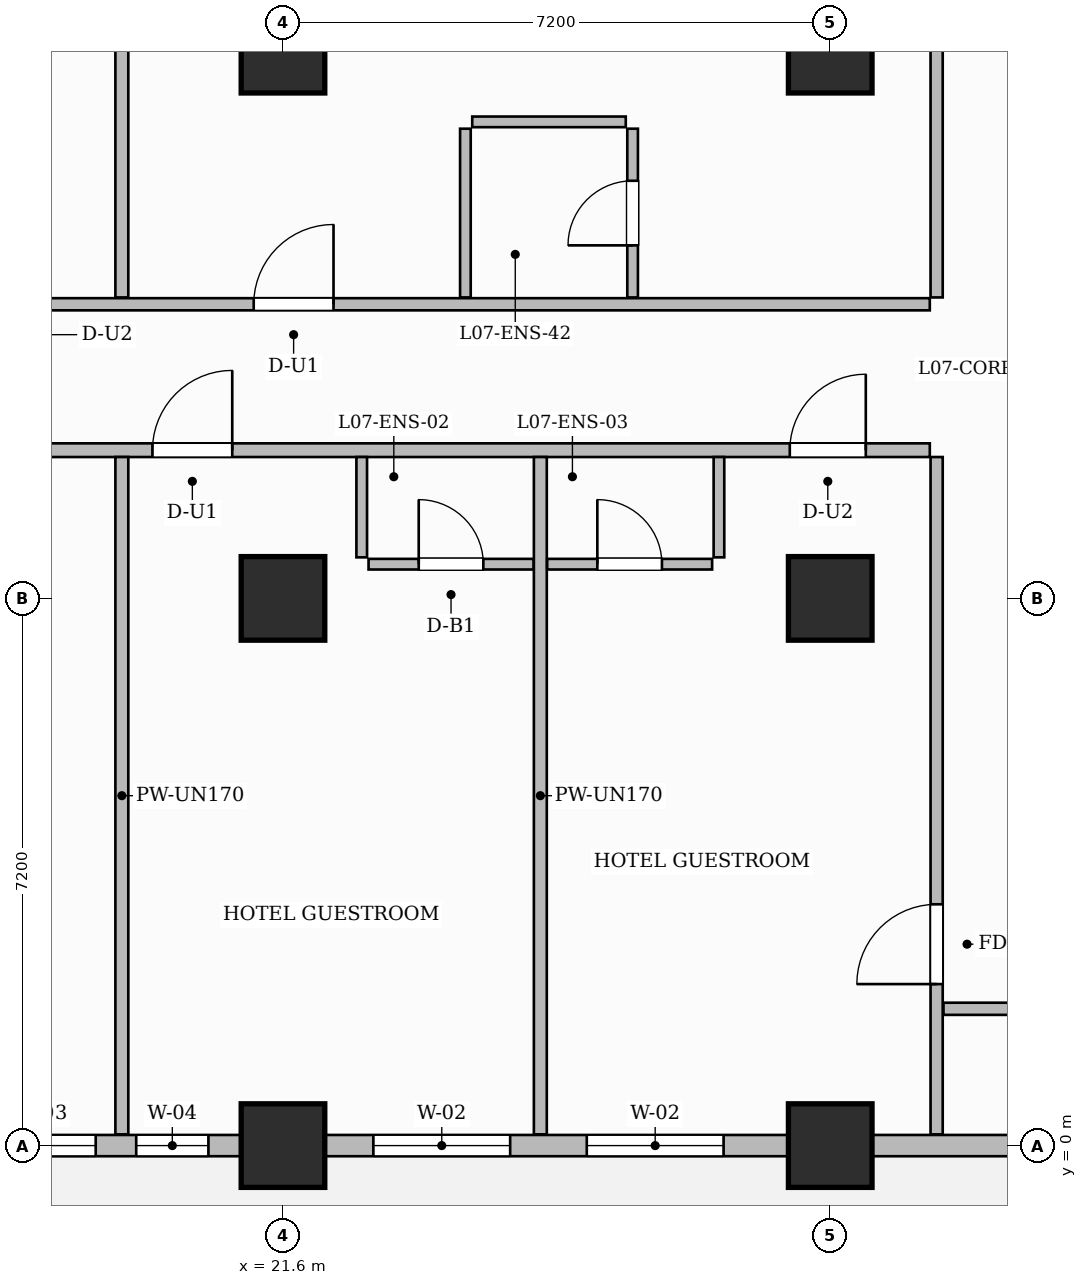
"""IFC4 building model, lengths in metres.
Left out: names, types, materials, properties, quantities, classifications, styles, units other than length and angle.
Written with IfcOpenShell. Run it as: python <this file> out.ifc"""

import sys

from ifc_helpers import new_model, si_unit, direction, frame, frame_2d, origin, origin_2d, place, context, subcontext, project, spatial, rectangle, extrude, source, transform, mapped, element, fill, save


model = new_model("IFC4")
c1 = context("Model", 3, precision=1e-05, world=origin(), true_north=direction((0.0, 1.0)))
c2 = subcontext(c1, "Body", "Model", "MODEL_VIEW")
j1 = project(units=[si_unit("LENGTHUNIT", "METRE"), si_unit("PLANEANGLEUNIT", "RADIAN")], contexts=[c1])
p1 = place(None, origin())
s1 = spatial("IfcSite", under=j1, at=p1, CompositionType="ELEMENT")
p2 = place(p1, origin())
s2 = spatial("IfcBuilding", under=s1, at=p2, CompositionType="ELEMENT")
p3 = place(p2, frame((0.0, 0.0, 36.1)))
s3 = spatial("IfcBuildingStorey", under=s2, at=p3, CompositionType="ELEMENT", Elevation=36.1)
m1 = source(origin(), c2, "Body", "SweptSolid", [
    extrude(rectangle(XDim=1.1, YDim=1.1, at=origin_2d()), origin(), (0.0, 0.0, 1.0), 3.7),
])
for number, where, z_axis, x_axis in (
    (1, (21.6, 0.0, 0.0), (0.0, 0.0, 1.0), (1.0, 0.0, 0.0)),
    (2, (21.6, 7.2, 0.0), (0.0, 0.0, 1.0), (1.0, 0.0, 0.0)),
    (3, (21.6, 14.4, 0.0), (0.0, 0.0, 1.0), (1.0, 0.0, 0.0)),
    (4, (28.8, 0.0, 0.0), (0.0, 0.0, 1.0), (1.0, 0.0, 0.0)),
    (5, (28.8, 7.2, 0.0), (0.0, 0.0, 1.0), (1.0, 0.0, 0.0)),
    (6, (28.8, 14.4, 0.0), (0.0, 0.0, 1.0), (1.0, 0.0, 0.0)),
):
    element("IfcColumn", number, at=place(p3, frame(where, z_axis=z_axis, x_axis=x_axis)), inside=s3, PredefinedType="COLUMN", context=c2, shape_type="MappedRepresentation", body=[
        mapped(m1, transform((0.0, 0.0, 0.0), scale=1.0)),
    ])
p4 = place(p3, frame((14.548, 9.15, 0.0), z_axis=(0.0, 0.0, 1.0), x_axis=(1.0, 0.0, 0.0)))
e7 = element("IfcWall", 7, at=p4, inside=s3, PredefinedType="PARTITIONING", context=c2, shape_type="SweptSolid", body=[
    extrude(rectangle(XDim=15.562, YDim=0.18, at=frame_2d((7.781, 0.0))), origin(), (0.0, 0.0, 1.0), 3.45),
])
p5 = place(p4, frame((2.908, 0.0, 0.0)))
e8 = element("IfcOpeningElement", 8, at=p5, cuts=e7, PredefinedType="OPENING", context=c2, shape_type="SweptSolid", body=[
    extrude(rectangle(XDim=1.0, YDim=2.2, at=frame_2d((0.5, 1.1))), frame((0.0, 0.1, 0.0), z_axis=(0.0, -1.0, 0.0), x_axis=(1.0, 0.0, 0.0)), (0.0, 0.0, 1.0), 0.2),
])
p6 = place(p4, frame((5.334, 0.0, 0.0)))
e9 = element("IfcOpeningElement", 9, at=p6, cuts=e7, PredefinedType="OPENING", context=c2, shape_type="SweptSolid", body=[
    extrude(rectangle(XDim=1.05, YDim=2.25, at=frame_2d((0.525, 1.125))), frame((0.0, 0.1, 0.0), z_axis=(0.0, -1.0, 0.0), x_axis=(1.0, 0.0, 0.0)), (0.0, 0.0, 1.0), 0.2),
])
p7 = place(p4, frame((13.72, 0.0, 0.0)))
e10 = element("IfcOpeningElement", 10, at=p7, cuts=e7, PredefinedType="OPENING", context=c2, shape_type="SweptSolid", body=[
    extrude(rectangle(XDim=1.0, YDim=2.2, at=frame_2d((0.5, 1.1))), frame((0.0, 0.1, 0.0), z_axis=(0.0, -1.0, 0.0), x_axis=(1.0, 0.0, 0.0)), (0.0, 0.0, 1.0), 0.2),
])
p8 = place(p3, frame((14.548, 11.07, 0.0), z_axis=(0.0, 0.0, 1.0), x_axis=(1.0, 0.0, 0.0)))
e11 = element("IfcWall", 11, at=p8, inside=s3, PredefinedType="PARTITIONING", context=c2, shape_type="SweptSolid", body=[
    extrude(rectangle(XDim=15.562, YDim=0.16, at=frame_2d((7.781, 0.0))), origin(), (0.0, 0.0, 1.0), 3.45),
])
p9 = place(p8, frame((2.938, 0.0, 0.0)))
e12 = element("IfcOpeningElement", 12, at=p9, cuts=e11, PredefinedType="OPENING", context=c2, shape_type="SweptSolid", body=[
    extrude(rectangle(XDim=1.0, YDim=2.2, at=frame_2d((0.5, 1.1))), frame((0.0, 0.09, 0.0), z_axis=(0.0, -1.0, 0.0), x_axis=(1.0, 0.0, 0.0)), (0.0, 0.0, 1.0), 0.18),
])
p10 = place(p8, frame((6.667, 0.0, 0.0)))
e13 = element("IfcOpeningElement", 13, at=p10, cuts=e11, PredefinedType="OPENING", context=c2, shape_type="SweptSolid", body=[
    extrude(rectangle(XDim=1.05, YDim=2.25, at=frame_2d((0.525, 1.125))), frame((0.0, 0.09, 0.0), z_axis=(0.0, -1.0, 0.0), x_axis=(1.0, 0.0, 0.0)), (0.0, 0.0, 1.0), 0.18),
])
p11 = place(p3, frame((30.2, 11.16, 0.0), z_axis=(0.0, 0.0, 1.0), x_axis=(0.0, 1.0, 0.0)))
e14 = element("IfcWall", 14, at=p11, inside=s3, PredefinedType="PARTITIONING", context=c2, shape_type="SweptSolid", body=[
    extrude(rectangle(XDim=10.3, YDim=0.16, at=frame_2d((5.15, 0.0))), origin(), (0.0, 0.0, 1.0), 3.45),
])
p12 = place(p3, frame((30.2, 0.148, 0.0), z_axis=(0.0, 0.0, 1.0), x_axis=(0.0, 1.0, 0.0)))
e15 = element("IfcWall", 15, at=p12, inside=s3, PredefinedType="PARTITIONING", context=c2, shape_type="SweptSolid", body=[
    extrude(rectangle(XDim=8.912, YDim=0.16, at=frame_2d((4.456, 0.0))), origin(), (0.0, 0.0, 1.0), 3.45),
])
p13 = place(p12, frame((1.977, 0.0, 0.0)))
e16 = element("IfcOpeningElement", 16, at=p13, cuts=e15, PredefinedType="OPENING", context=c2, shape_type="SweptSolid", body=[
    extrude(rectangle(XDim=1.05, YDim=2.15, at=frame_2d((0.525, 1.075))), frame((0.0, 0.09, 0.0), z_axis=(0.0, -1.0, 0.0), x_axis=(1.0, 0.0, 0.0)), (0.0, 0.0, 1.0), 0.18),
])
p14 = place(p3, frame((30.29, 1.8, 0.0), z_axis=(0.0, 0.0, 1.0), x_axis=(1.0, 0.0, 0.0)))
e17 = element("IfcWall", 17, at=p14, inside=s3, PredefinedType="PARTITIONING", context=c2, shape_type="SweptSolid", body=[
    extrude(rectangle(XDim=19.37, YDim=0.16, at=frame_2d((9.685, 0.0))), origin(), (0.0, 0.0, 1.0), 3.45),
])
p15 = place(p14, frame((9.735, 0.0, 0.0)))
e18 = element("IfcOpeningElement", 18, at=p15, cuts=e17, PredefinedType="OPENING", context=c2, shape_type="SweptSolid", body=[
    extrude(rectangle(XDim=0.95, YDim=2.15, at=frame_2d((0.475, 1.075))), frame((0.0, 0.09, 0.0), z_axis=(0.0, -1.0, 0.0), x_axis=(1.0, 0.0, 0.0)), (0.0, 0.0, 1.0), 0.18),
])
p16 = place(p3, frame((19.48, 0.148, 0.0), z_axis=(0.0, 0.0, 1.0), x_axis=(0.0, 1.0, 0.0)))
e19 = element("IfcWall", 19, at=p16, inside=s3, PredefinedType="PARTITIONING", context=c2, shape_type="SweptSolid", body=[
    extrude(rectangle(XDim=8.912, YDim=0.17, at=frame_2d((4.456, 0.0))), origin(), (0.0, 0.0, 1.0), 3.45),
])
p17 = place(p3, frame((24.986, 0.148, 0.0), z_axis=(0.0, 0.0, 1.0), x_axis=(0.0, 1.0, 0.0)))
e20 = element("IfcWall", 20, at=p17, inside=s3, PredefinedType="PARTITIONING", context=c2, shape_type="SweptSolid", body=[
    extrude(rectangle(XDim=8.912, YDim=0.17, at=frame_2d((4.456, 0.0))), origin(), (0.0, 0.0, 1.0), 3.035),
])
p18 = place(p3, frame((22.636, 7.74, 0.0), z_axis=(0.0, 0.0, 1.0), x_axis=(0.0, 1.0, 0.0)))
e21 = element("IfcWall", 21, at=p18, inside=s3, PredefinedType="PARTITIONING", context=c2, shape_type="SweptSolid", body=[
    extrude(rectangle(XDim=1.32, YDim=0.14, at=frame_2d((0.66, 0.0))), origin(), (0.0, 0.0, 1.0), 3.45),
])
p19 = place(p3, frame((22.726, 7.65, 0.0), z_axis=(0.0, 0.0, 1.0), x_axis=(1.0, 0.0, 0.0)))
e22 = element("IfcWall", 22, at=p19, inside=s3, PredefinedType="PARTITIONING", context=c2, shape_type="SweptSolid", body=[
    extrude(rectangle(XDim=2.17, YDim=0.14, at=frame_2d((1.085, 0.0))), origin(), (0.0, 0.0, 1.0), 3.45),
])
p20 = place(p19, frame((0.66, 0.0, 0.0)))
e23 = element("IfcOpeningElement", 23, at=p20, cuts=e22, PredefinedType="OPENING", context=c2, shape_type="SweptSolid", body=[
    extrude(rectangle(XDim=0.85, YDim=2.1, at=frame_2d((0.425, 1.05))), frame((0.0, 0.08, 0.0), z_axis=(0.0, -1.0, 0.0), x_axis=(1.0, 0.0, 0.0)), (0.0, 0.0, 1.0), 0.16),
])
p21 = place(p3, frame((27.336, 7.74, 0.0), z_axis=(0.0, 0.0, 1.0), x_axis=(0.0, 1.0, 0.0)))
e24 = element("IfcWall", 24, at=p21, inside=s3, PredefinedType="PARTITIONING", context=c2, shape_type="SweptSolid", body=[
    extrude(rectangle(XDim=1.32, YDim=0.14, at=frame_2d((0.66, 0.0))), origin(), (0.0, 0.0, 1.0), 3.45),
])
p22 = place(p3, frame((25.076, 7.65, 0.0), z_axis=(0.0, 0.0, 1.0), x_axis=(1.0, 0.0, 0.0)))
e25 = element("IfcWall", 25, at=p22, inside=s3, PredefinedType="PARTITIONING", context=c2, shape_type="SweptSolid", body=[
    extrude(rectangle(XDim=2.17, YDim=0.14, at=frame_2d((1.085, 0.0))), origin(), (0.0, 0.0, 1.0), 3.45),
])
p23 = place(p22, frame((0.66, 0.0, 0.0)))
e26 = element("IfcOpeningElement", 26, at=p23, cuts=e25, PredefinedType="OPENING", context=c2, shape_type="SweptSolid", body=[
    extrude(rectangle(XDim=0.85, YDim=2.1, at=frame_2d((0.425, 1.05))), frame((0.0, 0.08, 0.0), z_axis=(0.0, -1.0, 0.0), x_axis=(1.0, 0.0, 0.0)), (0.0, 0.0, 1.0), 0.16),
])
p24 = place(p3, frame((19.48, 11.16, 0.0), z_axis=(0.0, 0.0, 1.0), x_axis=(0.0, 1.0, 0.0)))
e27 = element("IfcWall", 27, at=p24, inside=s3, PredefinedType="PARTITIONING", context=c2, shape_type="SweptSolid", body=[
    extrude(rectangle(XDim=10.292, YDim=0.17, at=frame_2d((5.146, 0.0))), origin(), (0.0, 0.0, 1.0), 3.45),
])
p25 = place(p3, frame((24.0, 11.16, 0.0), z_axis=(0.0, 0.0, 1.0), x_axis=(0.0, 1.0, 0.0)))
e28 = element("IfcWall", 28, at=p25, inside=s3, PredefinedType="PARTITIONING", context=c2, shape_type="SweptSolid", body=[
    extrude(rectangle(XDim=2.22, YDim=0.14, at=frame_2d((1.11, 0.0))), origin(), (0.0, 0.0, 1.0), 3.45),
])
p26 = place(p3, frame((26.2, 11.16, 0.0), z_axis=(0.0, 0.0, 1.0), x_axis=(0.0, 1.0, 0.0)))
e29 = element("IfcWall", 29, at=p26, inside=s3, PredefinedType="PARTITIONING", context=c2, shape_type="SweptSolid", body=[
    extrude(rectangle(XDim=2.22, YDim=0.14, at=frame_2d((1.11, 0.0))), origin(), (0.0, 0.0, 1.0), 3.45),
])
p27 = place(p26, frame((0.685, 0.0, 0.0)))
e30 = element("IfcOpeningElement", 30, at=p27, cuts=e29, PredefinedType="OPENING", context=c2, shape_type="SweptSolid", body=[
    extrude(rectangle(XDim=0.85, YDim=2.1, at=frame_2d((0.425, 1.05))), frame((0.0, 0.08, 0.0), z_axis=(0.0, -1.0, 0.0), x_axis=(1.0, 0.0, 0.0)), (0.0, 0.0, 1.0), 0.16),
])
p28 = place(p3, frame((24.09, 13.47, 0.0), z_axis=(0.0, 0.0, 1.0), x_axis=(1.0, 0.0, 0.0)))
e31 = element("IfcWall", 31, at=p28, inside=s3, PredefinedType="PARTITIONING", context=c2, shape_type="SweptSolid", body=[
    extrude(rectangle(XDim=2.02, YDim=0.14, at=frame_2d((1.01, 0.0))), origin(), (0.0, 0.0, 1.0), 3.45),
])
p29 = place(p3, frame((14.4, 0.0, 0.0), z_axis=(0.0, 0.0, 1.0), x_axis=(1.0, 0.0, 0.0)))
e32 = element("IfcWall", 32, at=p29, inside=s3, PredefinedType="SOLIDWALL", context=c2, shape_type="SweptSolid", body=[
    extrude(rectangle(XDim=43.2, YDim=0.28, at=frame_2d((21.6, 0.0))), origin(), (0.0, 0.0, 1.0), 2.885),
])
p30 = place(p29, frame((1.5, 0.0, 0.0)))
e33 = element("IfcOpeningElement", 33, at=p30, cuts=e32, PredefinedType="OPENING", context=c2, shape_type="SweptSolid", body=[
    extrude(rectangle(XDim=1.2, YDim=2.2, at=frame_2d((0.6, 1.1))), frame((0.0, 0.15, 0.0), z_axis=(0.0, -1.0, 0.0), x_axis=(1.0, 0.0, 0.0)), (0.0, 0.0, 1.0), 0.3),
])
p31 = place(p29, frame((3.336, 0.0, 0.8)))
e34 = element("IfcOpeningElement", 34, at=p31, cuts=e32, PredefinedType="OPENING", context=c2, shape_type="SweptSolid", body=[
    extrude(rectangle(XDim=1.4, YDim=1.85, at=frame_2d((0.7, 0.925))), frame((0.0, 0.15, 0.0), z_axis=(0.0, -1.0, 0.0), x_axis=(1.0, 0.0, 0.0)), (0.0, 0.0, 1.0), 0.3),
])
p32 = place(p29, frame((5.269, 0.0, 0.8)))
e35 = element("IfcOpeningElement", 35, at=p32, cuts=e32, PredefinedType="OPENING", context=c2, shape_type="SweptSolid", body=[
    extrude(rectangle(XDim=0.95, YDim=1.75, at=frame_2d((0.475, 0.875))), frame((0.0, 0.15, 0.0), z_axis=(0.0, -1.0, 0.0), x_axis=(1.0, 0.0, 0.0)), (0.0, 0.0, 1.0), 0.3),
])
p33 = place(p29, frame((8.389, 0.0, 0.8)))
e36 = element("IfcOpeningElement", 36, at=p33, cuts=e32, PredefinedType="OPENING", context=c2, shape_type="SweptSolid", body=[
    extrude(rectangle(XDim=1.8, YDim=1.85, at=frame_2d((0.9, 0.925))), frame((0.0, 0.15, 0.0), z_axis=(0.0, -1.0, 0.0), x_axis=(1.0, 0.0, 0.0)), (0.0, 0.0, 1.0), 0.3),
])
p34 = place(p29, frame((11.197, 0.0, 0.8)))
e37 = element("IfcOpeningElement", 37, at=p34, cuts=e32, PredefinedType="OPENING", context=c2, shape_type="SweptSolid", body=[
    extrude(rectangle(XDim=1.8, YDim=1.85, at=frame_2d((0.9, 0.925))), frame((0.0, 0.15, 0.0), z_axis=(0.0, -1.0, 0.0), x_axis=(1.0, 0.0, 0.0)), (0.0, 0.0, 1.0), 0.3),
])
p35 = place(p29, frame((16.804, 0.0, 0.8)))
e38 = element("IfcOpeningElement", 38, at=p35, cuts=e32, PredefinedType="OPENING", context=c2, shape_type="SweptSolid", body=[
    extrude(rectangle(XDim=1.8, YDim=1.85, at=frame_2d((0.9, 0.925))), frame((0.0, 0.15, 0.0), z_axis=(0.0, -1.0, 0.0), x_axis=(1.0, 0.0, 0.0)), (0.0, 0.0, 1.0), 0.3),
])
p36 = place(p29, frame((21.725, 0.0, 0.8)))
e39 = element("IfcOpeningElement", 39, at=p36, cuts=e32, PredefinedType="OPENING", context=c2, shape_type="SweptSolid", body=[
    extrude(rectangle(XDim=1.8, YDim=1.85, at=frame_2d((0.9, 0.925))), frame((0.0, 0.15, 0.0), z_axis=(0.0, -1.0, 0.0), x_axis=(1.0, 0.0, 0.0)), (0.0, 0.0, 1.0), 0.3),
])
p37 = place(p29, frame((24.475, 0.0, 0.8)))
e40 = element("IfcOpeningElement", 40, at=p37, cuts=e32, PredefinedType="OPENING", context=c2, shape_type="SweptSolid", body=[
    extrude(rectangle(XDim=1.8, YDim=1.85, at=frame_2d((0.9, 0.925))), frame((0.0, 0.15, 0.0), z_axis=(0.0, -1.0, 0.0), x_axis=(1.0, 0.0, 0.0)), (0.0, 0.0, 1.0), 0.3),
])
p38 = place(p29, frame((29.075, 0.0, 0.8)))
e41 = element("IfcOpeningElement", 41, at=p38, cuts=e32, PredefinedType="OPENING", context=c2, shape_type="SweptSolid", body=[
    extrude(rectangle(XDim=1.8, YDim=1.85, at=frame_2d((0.9, 0.925))), frame((0.0, 0.15, 0.0), z_axis=(0.0, -1.0, 0.0), x_axis=(1.0, 0.0, 0.0)), (0.0, 0.0, 1.0), 0.3),
])
p39 = place(p29, frame((32.125, 0.0, 0.8)))
e42 = element("IfcOpeningElement", 42, at=p39, cuts=e32, PredefinedType="OPENING", context=c2, shape_type="SweptSolid", body=[
    extrude(rectangle(XDim=1.8, YDim=1.85, at=frame_2d((0.9, 0.925))), frame((0.0, 0.15, 0.0), z_axis=(0.0, -1.0, 0.0), x_axis=(1.0, 0.0, 0.0)), (0.0, 0.0, 1.0), 0.3),
])
p40 = place(p29, frame((36.875, 0.0, 0.8)))
e43 = element("IfcOpeningElement", 43, at=p40, cuts=e32, PredefinedType="OPENING", context=c2, shape_type="SweptSolid", body=[
    extrude(rectangle(XDim=1.8, YDim=1.85, at=frame_2d((0.9, 0.925))), frame((0.0, 0.15, 0.0), z_axis=(0.0, -1.0, 0.0), x_axis=(1.0, 0.0, 0.0)), (0.0, 0.0, 1.0), 0.3),
])
p41 = place(p29, frame((39.925, 0.0, 0.8)))
e44 = element("IfcOpeningElement", 44, at=p41, cuts=e32, PredefinedType="OPENING", context=c2, shape_type="SweptSolid", body=[
    extrude(rectangle(XDim=1.8, YDim=1.85, at=frame_2d((0.9, 0.925))), frame((0.0, 0.15, 0.0), z_axis=(0.0, -1.0, 0.0), x_axis=(1.0, 0.0, 0.0)), (0.0, 0.0, 1.0), 0.3),
])
m2 = source(origin(), c2, "Body", "SweptSolid", [
    extrude(rectangle(XDim=1.05, YDim=2.15, at=frame_2d((0.525, 1.075))), frame((0.0, 0.025, 0.0), z_axis=(0.0, -1.0, 0.0), x_axis=(1.0, 0.0, 0.0)), (0.0, 0.0, 1.0), 0.05),
])
p42 = place(p13, origin())
e45 = element("IfcDoor", 45, at=p42, inside=s3, OperationType="SINGLE_SWING_LEFT", PredefinedType="DOOR", context=c2, shape_type="MappedRepresentation", body=[
    mapped(m2, transform((0.0, 0.0, 0.0), scale=1.0)),
])
fill(e16, e45)
m3 = source(origin(), c2, "Body", "SweptSolid", [
    extrude(rectangle(XDim=0.85, YDim=2.1, at=frame_2d((0.425, 1.05))), frame((0.0, 0.025, 0.0), z_axis=(0.0, -1.0, 0.0), x_axis=(1.0, 0.0, 0.0)), (0.0, 0.0, 1.0), 0.05),
])
p43 = place(p20, origin())
e46 = element("IfcDoor", 46, at=p43, inside=s3, OperationType="SINGLE_SWING_LEFT", PredefinedType="DOOR", context=c2, shape_type="MappedRepresentation", body=[
    mapped(m3, transform((0.0, 0.0, 0.0), scale=1.0)),
])
fill(e23, e46)
m4 = source(origin(), c2, "Body", "SweptSolid", [
    extrude(rectangle(XDim=1.05, YDim=2.25, at=frame_2d((0.525, 1.125))), frame((0.0, 0.025, 0.0), z_axis=(0.0, -1.0, 0.0), x_axis=(1.0, 0.0, 0.0)), (0.0, 0.0, 1.0), 0.05),
])
p44 = place(p6, origin())
e47 = element("IfcDoor", 47, at=p44, inside=s3, OperationType="SINGLE_SWING_RIGHT", PredefinedType="DOOR", context=c2, shape_type="MappedRepresentation", body=[
    mapped(m4, transform((0.0, 0.0, 0.0), scale=1.0)),
])
fill(e9, e47)
p45 = place(p23, origin())
e48 = element("IfcDoor", 48, at=p45, inside=s3, OperationType="SINGLE_SWING_LEFT", PredefinedType="DOOR", context=c2, shape_type="MappedRepresentation", body=[
    mapped(m3, transform((0.0, 0.0, 0.0), scale=1.0)),
])
fill(e26, e48)
m5 = source(origin(), c2, "Body", "SweptSolid", [
    extrude(rectangle(XDim=1.0, YDim=2.2, at=frame_2d((0.5, 1.1))), frame((0.0, 0.025, 0.0), z_axis=(0.0, -1.0, 0.0), x_axis=(1.0, 0.0, 0.0)), (0.0, 0.0, 1.0), 0.05),
])
p46 = place(p7, origin())
e49 = element("IfcDoor", 49, at=p46, inside=s3, OperationType="SINGLE_SWING_RIGHT", PredefinedType="DOOR", context=c2, shape_type="MappedRepresentation", body=[
    mapped(m5, transform((0.0, 0.0, 0.0), scale=1.0)),
])
fill(e10, e49)
p47 = place(p27, origin())
e50 = element("IfcDoor", 50, at=p47, inside=s3, OperationType="SINGLE_SWING_LEFT", PredefinedType="DOOR", context=c2, shape_type="MappedRepresentation", body=[
    mapped(m3, transform((0.0, 0.0, 0.0), scale=1.0)),
])
fill(e30, e50)
p48 = place(p10, origin())
e51 = element("IfcDoor", 51, at=p48, inside=s3, OperationType="SINGLE_SWING_RIGHT", PredefinedType="DOOR", context=c2, shape_type="MappedRepresentation", body=[
    mapped(m4, transform((0.0, 0.0, 0.0), scale=1.0)),
])
fill(e13, e51)
m6 = source(origin(), c2, "Body", "SweptSolid", [
    extrude(rectangle(XDim=1.4, YDim=1.85, at=frame_2d((0.7, 0.925))), frame((0.0, 0.03, 0.0), z_axis=(0.0, -1.0, 0.0), x_axis=(1.0, 0.0, 0.0)), (0.0, 0.0, 1.0), 0.06),
])
p49 = place(p31, origin())
e52 = element("IfcWindow", 52, at=p49, inside=s3, PartitioningType="SINGLE_PANEL", PredefinedType="WINDOW", context=c2, shape_type="MappedRepresentation", body=[
    mapped(m6, transform((0.0, 0.0, 0.0), scale=1.0)),
])
fill(e34, e52)
m7 = source(origin(), c2, "Body", "SweptSolid", [
    extrude(rectangle(XDim=0.95, YDim=1.75, at=frame_2d((0.475, 0.875))), frame((0.0, 0.03, 0.0), z_axis=(0.0, -1.0, 0.0), x_axis=(1.0, 0.0, 0.0)), (0.0, 0.0, 1.0), 0.06),
])
p50 = place(p32, origin())
e53 = element("IfcWindow", 53, at=p50, inside=s3, PartitioningType="SINGLE_PANEL", PredefinedType="WINDOW", context=c2, shape_type="MappedRepresentation", body=[
    mapped(m7, transform((0.0, 0.0, 0.0), scale=1.0)),
])
fill(e35, e53)
m8 = source(origin(), c2, "Body", "SweptSolid", [
    extrude(rectangle(XDim=1.8, YDim=1.85, at=frame_2d((0.9, 0.925))), frame((0.0, 0.03, 0.0), z_axis=(0.0, -1.0, 0.0), x_axis=(1.0, 0.0, 0.0)), (0.0, 0.0, 1.0), 0.06),
])
p51 = place(p33, origin())
e54 = element("IfcWindow", 54, at=p51, inside=s3, PartitioningType="DOUBLE_PANEL_VERTICAL", PredefinedType="WINDOW", context=c2, shape_type="MappedRepresentation", body=[
    mapped(m8, transform((0.0, 0.0, 0.0), scale=1.0)),
])
fill(e36, e54)
p52 = place(p34, origin())
e55 = element("IfcWindow", 55, at=p52, inside=s3, PartitioningType="DOUBLE_PANEL_VERTICAL", PredefinedType="WINDOW", context=c2, shape_type="MappedRepresentation", body=[
    mapped(m8, transform((0.0, 0.0, 0.0), scale=1.0)),
])
fill(e37, e55)
save(model, sys.argv[1])
